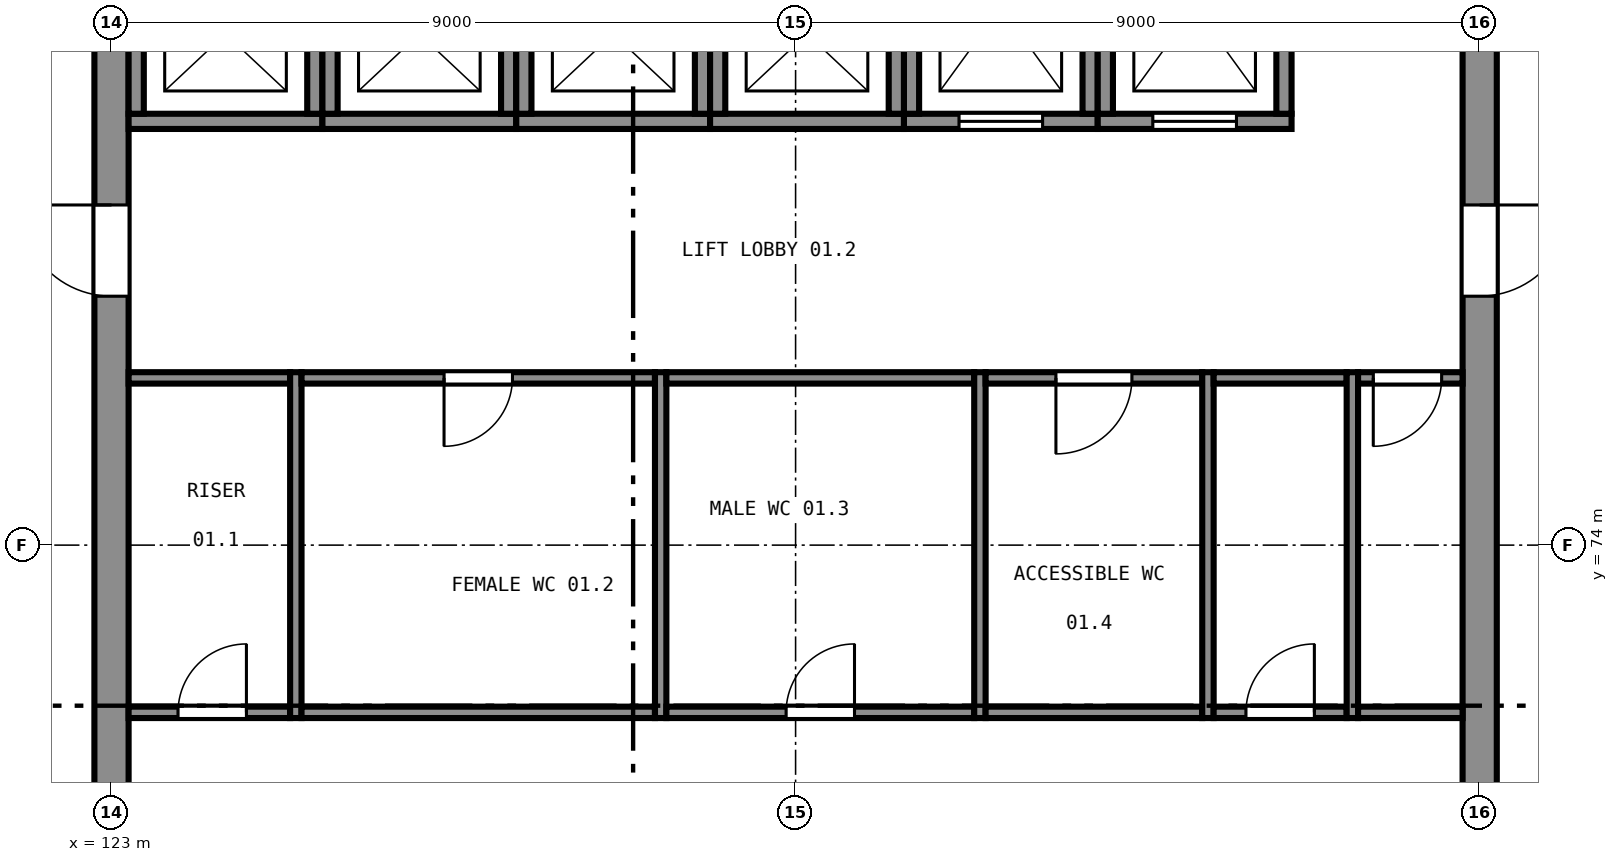
"""IFC4 building model, lengths in metres.
Left out: names, types, materials, properties, quantities, classifications, styles, units other than length and angle.
Written with IfcOpenShell. Run it as: python <this file> out.ifc"""

import sys

from ifc_helpers import new_model, si_unit, direction, frame, frame_2d, origin, place, context, subcontext, project, spatial, rectangle, extrude, element, fill, save


model = new_model("IFC4")
c1 = context("Model", 3, precision=1e-05, world=origin(), true_north=direction((0.0, 1.0)))
c2 = subcontext(c1, "Body", "Model", "MODEL_VIEW")
j1 = project(units=[si_unit("LENGTHUNIT", "METRE"), si_unit("PLANEANGLEUNIT", "RADIAN")], contexts=[c1])
p1 = place(None, origin())
s1 = spatial("IfcSite", under=j1, at=p1, CompositionType="ELEMENT")
p2 = place(p1, origin())
s2 = spatial("IfcBuilding", under=s1, at=p2, CompositionType="ELEMENT")
p3 = place(p2, frame((0.0, 0.0, 5.5)))
s3 = spatial("IfcBuildingStorey", under=s2, at=p3, CompositionType="ELEMENT", Elevation=5.5)
p4 = place(p3, frame((141.0, 65.225, 0.0), z_axis=(0.0, 0.0, 1.0), x_axis=(0.0, 1.0, 0.0)))
e1 = element("IfcWall", 1, at=p4, inside=s3, PredefinedType="SHEAR", context=c2, shape_type="SweptSolid", body=[
    extrude(rectangle(XDim=17.55, YDim=0.45, at=frame_2d((8.775, 0.0))), origin(), (0.0, 0.0, 1.0), 4.0),
])
p5 = place(p4, frame((4.3, 0.0, 0.0)))
e2 = element("IfcOpeningElement", 2, at=p5, cuts=e1, PredefinedType="OPENING", context=c2, shape_type="SweptSolid", body=[
    extrude(rectangle(XDim=1.2, YDim=2.1, at=frame_2d((0.6, 1.05))), frame((0.0, 0.235, 0.0), z_axis=(0.0, -1.0, 0.0), x_axis=(1.0, 0.0, 0.0)), (0.0, 0.0, 1.0), 0.47),
])
p6 = place(p4, frame((12.05, 0.0, 0.0)))
e3 = element("IfcOpeningElement", 3, at=p6, cuts=e1, PredefinedType="OPENING", context=c2, shape_type="SweptSolid", body=[
    extrude(rectangle(XDim=1.2, YDim=2.1, at=frame_2d((0.6, 1.05))), frame((0.0, 0.235, 0.0), z_axis=(0.0, -1.0, 0.0), x_axis=(1.0, 0.0, 0.0)), (0.0, 0.0, 1.0), 0.47),
])
p7 = place(p3, frame((123.0, 82.775, 0.0), z_axis=(0.0, 0.0, 1.0), x_axis=(0.0, -1.0, 0.0)))
e4 = element("IfcWall", 4, at=p7, inside=s3, PredefinedType="SHEAR", context=c2, shape_type="SweptSolid", body=[
    extrude(rectangle(XDim=17.55, YDim=0.45, at=frame_2d((8.775, 0.0))), origin(), (0.0, 0.0, 1.0), 4.0),
])
p8 = place(p7, frame((12.05, 0.0, 0.0)))
e5 = element("IfcOpeningElement", 5, at=p8, cuts=e4, PredefinedType="OPENING", context=c2, shape_type="SweptSolid", body=[
    extrude(rectangle(XDim=1.2, YDim=2.1, at=frame_2d((0.6, 1.05))), frame((0.0, 0.235, 0.0), z_axis=(0.0, -1.0, 0.0), x_axis=(1.0, 0.0, 0.0)), (0.0, 0.0, 1.0), 0.47),
])
p9 = place(p7, frame((4.3, 0.0, 0.0)))
e6 = element("IfcOpeningElement", 6, at=p9, cuts=e4, PredefinedType="OPENING", context=c2, shape_type="SweptSolid", body=[
    extrude(rectangle(XDim=1.2, YDim=2.1, at=frame_2d((0.6, 1.05))), frame((0.0, 0.235, 0.0), z_axis=(0.0, -1.0, 0.0), x_axis=(1.0, 0.0, 0.0)), (0.0, 0.0, 1.0), 0.47),
])
p10 = place(p3, frame((123.225, 79.575, 0.0), z_axis=(0.0, 0.0, 1.0), x_axis=(1.0, 0.0, 0.0)))
e7 = element("IfcWall", 7, at=p10, inside=s3, PredefinedType="SHEAR", context=c2, shape_type="SweptSolid", body=[
    extrude(rectangle(XDim=2.55, YDim=0.2, at=frame_2d((1.275, 0.0))), origin(), (0.0, 0.0, 1.0), 4.0),
])
for number, where, z_axis, x_axis in (
    (8, (125.675, 79.675, 0.0), (0.0, 0.0, 1.0), (0.0, 1.0, 0.0)),
    (9, (123.325, 81.775, 0.0), (0.0, 0.0, 1.0), (0.0, -1.0, 0.0)),
):
    element("IfcWall", number, at=place(p3, frame(where, z_axis=z_axis, x_axis=x_axis)), inside=s3, PredefinedType="SHEAR", context=c2, shape_type="SweptSolid", body=[
        extrude(rectangle(XDim=2.1, YDim=0.2, at=frame_2d((1.05, 0.0))), origin(), (0.0, 0.0, 1.0), 4.0),
    ])
p11 = place(p3, frame((125.775, 79.575, 0.0), z_axis=(0.0, 0.0, 1.0), x_axis=(1.0, 0.0, 0.0)))
e10 = element("IfcWall", 10, at=p11, inside=s3, PredefinedType="SHEAR", context=c2, shape_type="SweptSolid", body=[
    extrude(rectangle(XDim=2.55, YDim=0.2, at=frame_2d((1.275, 0.0))), origin(), (0.0, 0.0, 1.0), 4.0),
])
for number, where, z_axis, x_axis in (
    (11, (128.225, 79.675, 0.0), (0.0, 0.0, 1.0), (0.0, 1.0, 0.0)),
    (12, (125.875, 81.775, 0.0), (0.0, 0.0, 1.0), (0.0, -1.0, 0.0)),
):
    element("IfcWall", number, at=place(p3, frame(where, z_axis=z_axis, x_axis=x_axis)), inside=s3, PredefinedType="SHEAR", context=c2, shape_type="SweptSolid", body=[
        extrude(rectangle(XDim=2.1, YDim=0.2, at=frame_2d((1.05, 0.0))), origin(), (0.0, 0.0, 1.0), 4.0),
    ])
p12 = place(p3, frame((128.325, 79.575, 0.0), z_axis=(0.0, 0.0, 1.0), x_axis=(1.0, 0.0, 0.0)))
e13 = element("IfcWall", 13, at=p12, inside=s3, PredefinedType="SHEAR", context=c2, shape_type="SweptSolid", body=[
    extrude(rectangle(XDim=2.55, YDim=0.2, at=frame_2d((1.275, 0.0))), origin(), (0.0, 0.0, 1.0), 4.0),
])
for number, where, z_axis, x_axis in (
    (14, (130.775, 79.675, 0.0), (0.0, 0.0, 1.0), (0.0, 1.0, 0.0)),
    (15, (128.425, 81.775, 0.0), (0.0, 0.0, 1.0), (0.0, -1.0, 0.0)),
):
    element("IfcWall", number, at=place(p3, frame(where, z_axis=z_axis, x_axis=x_axis)), inside=s3, PredefinedType="SHEAR", context=c2, shape_type="SweptSolid", body=[
        extrude(rectangle(XDim=2.1, YDim=0.2, at=frame_2d((1.05, 0.0))), origin(), (0.0, 0.0, 1.0), 4.0),
    ])
p13 = place(p3, frame((130.875, 79.575, 0.0), z_axis=(0.0, 0.0, 1.0), x_axis=(1.0, 0.0, 0.0)))
e16 = element("IfcWall", 16, at=p13, inside=s3, PredefinedType="SHEAR", context=c2, shape_type="SweptSolid", body=[
    extrude(rectangle(XDim=2.55, YDim=0.2, at=frame_2d((1.275, 0.0))), origin(), (0.0, 0.0, 1.0), 4.0),
])
for number, where, z_axis, x_axis in (
    (17, (133.325, 79.675, 0.0), (0.0, 0.0, 1.0), (0.0, 1.0, 0.0)),
    (18, (130.975, 81.775, 0.0), (0.0, 0.0, 1.0), (0.0, -1.0, 0.0)),
):
    element("IfcWall", number, at=place(p3, frame(where, z_axis=z_axis, x_axis=x_axis)), inside=s3, PredefinedType="SHEAR", context=c2, shape_type="SweptSolid", body=[
        extrude(rectangle(XDim=2.1, YDim=0.2, at=frame_2d((1.05, 0.0))), origin(), (0.0, 0.0, 1.0), 4.0),
    ])
p14 = place(p3, frame((133.425, 79.575, 0.0), z_axis=(0.0, 0.0, 1.0), x_axis=(1.0, 0.0, 0.0)))
e19 = element("IfcWall", 19, at=p14, inside=s3, PredefinedType="SHEAR", context=c2, shape_type="SweptSolid", body=[
    extrude(rectangle(XDim=2.55, YDim=0.2, at=frame_2d((1.275, 0.0))), origin(), (0.0, 0.0, 1.0), 4.0),
])
p15 = place(p14, frame((0.725, 0.0, 0.0)))
e20 = element("IfcOpeningElement", 20, at=p15, cuts=e19, PredefinedType="OPENING", context=c2, shape_type="SweptSolid", body=[
    extrude(rectangle(XDim=1.1, YDim=2.1, at=frame_2d((0.55, 1.05))), frame((0.0, 0.11, 0.0), z_axis=(0.0, -1.0, 0.0), x_axis=(1.0, 0.0, 0.0)), (0.0, 0.0, 1.0), 0.22),
])
for number, where, z_axis, x_axis in (
    (21, (135.875, 79.675, 0.0), (0.0, 0.0, 1.0), (0.0, 1.0, 0.0)),
    (22, (133.525, 82.475, 0.0), (0.0, 0.0, 1.0), (0.0, -1.0, 0.0)),
):
    element("IfcWall", number, at=place(p3, frame(where, z_axis=z_axis, x_axis=x_axis)), inside=s3, PredefinedType="SHEAR", context=c2, shape_type="SweptSolid", body=[
        extrude(rectangle(XDim=2.8, YDim=0.2, at=frame_2d((1.4, 0.0))), origin(), (0.0, 0.0, 1.0), 4.0),
    ])
p16 = place(p3, frame((135.975, 79.575, 0.0), z_axis=(0.0, 0.0, 1.0), x_axis=(1.0, 0.0, 0.0)))
e23 = element("IfcWall", 23, at=p16, inside=s3, PredefinedType="SHEAR", context=c2, shape_type="SweptSolid", body=[
    extrude(rectangle(XDim=2.55, YDim=0.2, at=frame_2d((1.275, 0.0))), origin(), (0.0, 0.0, 1.0), 4.0),
])
p17 = place(p16, frame((0.725, 0.0, 0.0)))
e24 = element("IfcOpeningElement", 24, at=p17, cuts=e23, PredefinedType="OPENING", context=c2, shape_type="SweptSolid", body=[
    extrude(rectangle(XDim=1.1, YDim=2.1, at=frame_2d((0.55, 1.05))), frame((0.0, 0.11, 0.0), z_axis=(0.0, -1.0, 0.0), x_axis=(1.0, 0.0, 0.0)), (0.0, 0.0, 1.0), 0.22),
])
for number, where, z_axis, x_axis in (
    (25, (138.425, 79.675, 0.0), (0.0, 0.0, 1.0), (0.0, 1.0, 0.0)),
    (26, (136.075, 82.475, 0.0), (0.0, 0.0, 1.0), (0.0, -1.0, 0.0)),
):
    element("IfcWall", number, at=place(p3, frame(where, z_axis=z_axis, x_axis=x_axis)), inside=s3, PredefinedType="SHEAR", context=c2, shape_type="SweptSolid", body=[
        extrude(rectangle(XDim=2.8, YDim=0.2, at=frame_2d((1.4, 0.0))), origin(), (0.0, 0.0, 1.0), 4.0),
    ])
p18 = place(p3, frame((125.425, 71.725, 0.0), z_axis=(0.0, 0.0, 1.0), x_axis=(0.0, 1.0, 0.0)))
e27 = element("IfcWall", 27, at=p18, inside=s3, PredefinedType="PARTITIONING", context=c2, shape_type="SweptSolid", body=[
    extrude(rectangle(XDim=4.55, YDim=0.15, at=frame_2d((2.275, 0.0))), origin(), (0.0, 0.0, 1.0), 3.75),
])
p19 = place(p3, frame((123.225, 71.8, 0.0), z_axis=(0.0, 0.0, 1.0), x_axis=(1.0, 0.0, 0.0)))
e28 = element("IfcWall", 28, at=p19, inside=s3, PredefinedType="PARTITIONING", context=c2, shape_type="SweptSolid", body=[
    extrude(rectangle(XDim=2.125, YDim=0.15, at=frame_2d((1.062, 0.0))), origin(), (0.0, 0.0, 1.0), 3.75),
])
p20 = place(p19, frame((0.65, 0.0, 0.0)))
e29 = element("IfcOpeningElement", 29, at=p20, cuts=e28, PredefinedType="OPENING", context=c2, shape_type="SweptSolid", body=[
    extrude(rectangle(XDim=0.9, YDim=2.1, at=frame_2d((0.45, 1.05))), frame((0.0, 0.085, 0.0), z_axis=(0.0, -1.0, 0.0), x_axis=(1.0, 0.0, 0.0)), (0.0, 0.0, 1.0), 0.17),
])
p21 = place(p3, frame((123.225, 76.2, 0.0), z_axis=(0.0, 0.0, 1.0), x_axis=(1.0, 0.0, 0.0)))
e30 = element("IfcWall", 30, at=p21, inside=s3, PredefinedType="PARTITIONING", context=c2, shape_type="SweptSolid", body=[
    extrude(rectangle(XDim=2.125, YDim=0.15, at=frame_2d((1.062, 0.0))), origin(), (0.0, 0.0, 1.0), 3.75),
])
p22 = place(p3, frame((130.225, 71.725, 0.0), z_axis=(0.0, 0.0, 1.0), x_axis=(0.0, 1.0, 0.0)))
e31 = element("IfcWall", 31, at=p22, inside=s3, PredefinedType="PARTITIONING", context=c2, shape_type="SweptSolid", body=[
    extrude(rectangle(XDim=4.55, YDim=0.15, at=frame_2d((2.275, 0.0))), origin(), (0.0, 0.0, 1.0), 3.75),
])
p23 = place(p3, frame((125.5, 71.8, 0.0), z_axis=(0.0, 0.0, 1.0), x_axis=(1.0, 0.0, 0.0)))
e32 = element("IfcWall", 32, at=p23, inside=s3, PredefinedType="PARTITIONING", context=c2, shape_type="SweptSolid", body=[
    extrude(rectangle(XDim=4.65, YDim=0.15, at=frame_2d((2.325, 0.0))), origin(), (0.0, 0.0, 1.0), 3.75),
])
p24 = place(p3, frame((125.5, 76.2, 0.0), z_axis=(0.0, 0.0, 1.0), x_axis=(1.0, 0.0, 0.0)))
e33 = element("IfcWall", 33, at=p24, inside=s3, PredefinedType="PARTITIONING", context=c2, shape_type="SweptSolid", body=[
    extrude(rectangle(XDim=4.65, YDim=0.15, at=frame_2d((2.325, 0.0))), origin(), (0.0, 0.0, 1.0), 3.75),
])
p25 = place(p24, frame((1.875, 0.0, 0.0)))
e34 = element("IfcOpeningElement", 34, at=p25, cuts=e33, PredefinedType="OPENING", context=c2, shape_type="SweptSolid", body=[
    extrude(rectangle(XDim=0.9, YDim=2.1, at=frame_2d((0.45, 1.05))), frame((0.0, 0.085, 0.0), z_axis=(0.0, -1.0, 0.0), x_axis=(1.0, 0.0, 0.0)), (0.0, 0.0, 1.0), 0.17),
])
p26 = place(p3, frame((134.425, 71.725, 0.0), z_axis=(0.0, 0.0, 1.0), x_axis=(0.0, 1.0, 0.0)))
e35 = element("IfcWall", 35, at=p26, inside=s3, PredefinedType="PARTITIONING", context=c2, shape_type="SweptSolid", body=[
    extrude(rectangle(XDim=4.55, YDim=0.15, at=frame_2d((2.275, 0.0))), origin(), (0.0, 0.0, 1.0), 3.75),
])
p27 = place(p3, frame((130.3, 71.8, 0.0), z_axis=(0.0, 0.0, 1.0), x_axis=(1.0, 0.0, 0.0)))
e36 = element("IfcWall", 36, at=p27, inside=s3, PredefinedType="PARTITIONING", context=c2, shape_type="SweptSolid", body=[
    extrude(rectangle(XDim=4.05, YDim=0.15, at=frame_2d((2.025, 0.0))), origin(), (0.0, 0.0, 1.0), 3.75),
])
p28 = place(p27, frame((1.575, 0.0, 0.0)))
e37 = element("IfcOpeningElement", 37, at=p28, cuts=e36, PredefinedType="OPENING", context=c2, shape_type="SweptSolid", body=[
    extrude(rectangle(XDim=0.9, YDim=2.1, at=frame_2d((0.45, 1.05))), frame((0.0, 0.085, 0.0), z_axis=(0.0, -1.0, 0.0), x_axis=(1.0, 0.0, 0.0)), (0.0, 0.0, 1.0), 0.17),
])
p29 = place(p3, frame((130.3, 76.2, 0.0), z_axis=(0.0, 0.0, 1.0), x_axis=(1.0, 0.0, 0.0)))
e38 = element("IfcWall", 38, at=p29, inside=s3, PredefinedType="PARTITIONING", context=c2, shape_type="SweptSolid", body=[
    extrude(rectangle(XDim=4.05, YDim=0.15, at=frame_2d((2.025, 0.0))), origin(), (0.0, 0.0, 1.0), 3.75),
])
p30 = place(p3, frame((137.425, 71.725, 0.0), z_axis=(0.0, 0.0, 1.0), x_axis=(0.0, 1.0, 0.0)))
e39 = element("IfcWall", 39, at=p30, inside=s3, PredefinedType="PARTITIONING", context=c2, shape_type="SweptSolid", body=[
    extrude(rectangle(XDim=4.55, YDim=0.15, at=frame_2d((2.275, 0.0))), origin(), (0.0, 0.0, 1.0), 3.75),
])
p31 = place(p3, frame((134.5, 71.8, 0.0), z_axis=(0.0, 0.0, 1.0), x_axis=(1.0, 0.0, 0.0)))
e40 = element("IfcWall", 40, at=p31, inside=s3, PredefinedType="PARTITIONING", context=c2, shape_type="SweptSolid", body=[
    extrude(rectangle(XDim=2.85, YDim=0.15, at=frame_2d((1.425, 0.0))), origin(), (0.0, 0.0, 1.0), 3.75),
])
p32 = place(p3, frame((134.5, 76.2, 0.0), z_axis=(0.0, 0.0, 1.0), x_axis=(1.0, 0.0, 0.0)))
e41 = element("IfcWall", 41, at=p32, inside=s3, PredefinedType="PARTITIONING", context=c2, shape_type="SweptSolid", body=[
    extrude(rectangle(XDim=2.85, YDim=0.15, at=frame_2d((1.425, 0.0))), origin(), (0.0, 0.0, 1.0), 3.75),
])
p33 = place(p32, frame((0.925, 0.0, 0.0)))
e42 = element("IfcOpeningElement", 42, at=p33, cuts=e41, PredefinedType="OPENING", context=c2, shape_type="SweptSolid", body=[
    extrude(rectangle(XDim=1.0, YDim=2.1, at=frame_2d((0.5, 1.05))), frame((0.0, 0.085, 0.0), z_axis=(0.0, -1.0, 0.0), x_axis=(1.0, 0.0, 0.0)), (0.0, 0.0, 1.0), 0.17),
])
p34 = place(p3, frame((139.325, 71.725, 0.0), z_axis=(0.0, 0.0, 1.0), x_axis=(0.0, 1.0, 0.0)))
e43 = element("IfcWall", 43, at=p34, inside=s3, PredefinedType="PARTITIONING", context=c2, shape_type="SweptSolid", body=[
    extrude(rectangle(XDim=4.55, YDim=0.15, at=frame_2d((2.275, 0.0))), origin(), (0.0, 0.0, 1.0), 3.75),
])
p35 = place(p3, frame((137.5, 71.8, 0.0), z_axis=(0.0, 0.0, 1.0), x_axis=(1.0, 0.0, 0.0)))
e44 = element("IfcWall", 44, at=p35, inside=s3, PredefinedType="PARTITIONING", context=c2, shape_type="SweptSolid", body=[
    extrude(rectangle(XDim=1.75, YDim=0.15, at=frame_2d((0.875, 0.0))), origin(), (0.0, 0.0, 1.0), 3.75),
])
p36 = place(p35, frame((0.425, 0.0, 0.0)))
e45 = element("IfcOpeningElement", 45, at=p36, cuts=e44, PredefinedType="OPENING", context=c2, shape_type="SweptSolid", body=[
    extrude(rectangle(XDim=0.9, YDim=2.1, at=frame_2d((0.45, 1.05))), frame((0.0, 0.085, 0.0), z_axis=(0.0, -1.0, 0.0), x_axis=(1.0, 0.0, 0.0)), (0.0, 0.0, 1.0), 0.17),
])
p37 = place(p3, frame((137.5, 76.2, 0.0), z_axis=(0.0, 0.0, 1.0), x_axis=(1.0, 0.0, 0.0)))
e46 = element("IfcWall", 46, at=p37, inside=s3, PredefinedType="PARTITIONING", context=c2, shape_type="SweptSolid", body=[
    extrude(rectangle(XDim=1.75, YDim=0.15, at=frame_2d((0.875, 0.0))), origin(), (0.0, 0.0, 1.0), 3.75),
])
p38 = place(p3, frame((139.4, 71.8, 0.0), z_axis=(0.0, 0.0, 1.0), x_axis=(1.0, 0.0, 0.0)))
e47 = element("IfcWall", 47, at=p38, inside=s3, PredefinedType="PARTITIONING", context=c2, shape_type="SweptSolid", body=[
    extrude(rectangle(XDim=1.375, YDim=0.15, at=frame_2d((0.688, 0.0))), origin(), (0.0, 0.0, 1.0), 3.75),
])
p39 = place(p3, frame((139.4, 76.2, 0.0), z_axis=(0.0, 0.0, 1.0), x_axis=(1.0, 0.0, 0.0)))
e48 = element("IfcWall", 48, at=p39, inside=s3, PredefinedType="PARTITIONING", context=c2, shape_type="SweptSolid", body=[
    extrude(rectangle(XDim=1.375, YDim=0.15, at=frame_2d((0.688, 0.0))), origin(), (0.0, 0.0, 1.0), 3.75),
])
p40 = place(p39, frame((0.2, 0.0, 0.0)))
e49 = element("IfcOpeningElement", 49, at=p40, cuts=e48, PredefinedType="OPENING", context=c2, shape_type="SweptSolid", body=[
    extrude(rectangle(XDim=0.9, YDim=2.1, at=frame_2d((0.45, 1.05))), frame((0.0, 0.085, 0.0), z_axis=(0.0, -1.0, 0.0), x_axis=(1.0, 0.0, 0.0)), (0.0, 0.0, 1.0), 0.17),
])
p41 = place(p15, origin())
e50 = element("IfcDoor", 50, at=p41, inside=s3, OperationType="SLIDING_TO_LEFT", PredefinedType="DOOR", context=c2, shape_type="SweptSolid", body=[
    extrude(rectangle(XDim=1.1, YDim=2.1, at=frame_2d((0.55, 1.05))), frame((0.0, 0.025, 0.0), z_axis=(0.0, -1.0, 0.0), x_axis=(1.0, 0.0, 0.0)), (0.0, 0.0, 1.0), 0.05),
])
fill(e20, e50)
p42 = place(p17, origin())
e51 = element("IfcDoor", 51, at=p42, inside=s3, OperationType="SLIDING_TO_LEFT", PredefinedType="DOOR", context=c2, shape_type="SweptSolid", body=[
    extrude(rectangle(XDim=1.1, YDim=2.1, at=frame_2d((0.55, 1.05))), frame((0.0, 0.025, 0.0), z_axis=(0.0, -1.0, 0.0), x_axis=(1.0, 0.0, 0.0)), (0.0, 0.0, 1.0), 0.05),
])
fill(e24, e51)
p43 = place(p9, frame((1.2, 0.0, 0.0), z_axis=(0.0, 0.0, 1.0), x_axis=(-1.0, 0.0, 0.0)))
e52 = element("IfcDoor", 52, at=p43, inside=s3, OperationType="SINGLE_SWING_LEFT", PredefinedType="DOOR", context=c2, shape_type="SweptSolid", body=[
    extrude(rectangle(XDim=1.2, YDim=2.1, at=frame_2d((0.6, 1.05))), frame((0.0, 0.025, 0.0), z_axis=(0.0, -1.0, 0.0), x_axis=(1.0, 0.0, 0.0)), (0.0, 0.0, 1.0), 0.05),
])
fill(e6, e52)
p44 = place(p6, frame((1.2, 0.0, 0.0), z_axis=(0.0, 0.0, 1.0), x_axis=(-1.0, 0.0, 0.0)))
e53 = element("IfcDoor", 53, at=p44, inside=s3, OperationType="SINGLE_SWING_RIGHT", PredefinedType="DOOR", context=c2, shape_type="SweptSolid", body=[
    extrude(rectangle(XDim=1.2, YDim=2.1, at=frame_2d((0.6, 1.05))), frame((0.0, 0.025, 0.0), z_axis=(0.0, -1.0, 0.0), x_axis=(1.0, 0.0, 0.0)), (0.0, 0.0, 1.0), 0.05),
])
fill(e3, e53)
p45 = place(p20, origin())
e54 = element("IfcDoor", 54, at=p45, inside=s3, OperationType="SINGLE_SWING_LEFT", PredefinedType="DOOR", context=c2, shape_type="SweptSolid", body=[
    extrude(rectangle(XDim=0.9, YDim=2.1, at=frame_2d((0.45, 1.05))), frame((0.0, 0.025, 0.0), z_axis=(0.0, -1.0, 0.0), x_axis=(1.0, 0.0, 0.0)), (0.0, 0.0, 1.0), 0.05),
])
fill(e29, e54)
p46 = place(p25, frame((0.9, 0.0, 0.0), z_axis=(0.0, 0.0, 1.0), x_axis=(-1.0, 0.0, 0.0)))
e55 = element("IfcDoor", 55, at=p46, inside=s3, OperationType="SINGLE_SWING_LEFT", PredefinedType="DOOR", context=c2, shape_type="SweptSolid", body=[
    extrude(rectangle(XDim=0.9, YDim=2.1, at=frame_2d((0.45, 1.05))), frame((0.0, 0.025, 0.0), z_axis=(0.0, -1.0, 0.0), x_axis=(1.0, 0.0, 0.0)), (0.0, 0.0, 1.0), 0.05),
])
fill(e34, e55)
p47 = place(p28, origin())
e56 = element("IfcDoor", 56, at=p47, inside=s3, OperationType="SINGLE_SWING_LEFT", PredefinedType="DOOR", context=c2, shape_type="SweptSolid", body=[
    extrude(rectangle(XDim=0.9, YDim=2.1, at=frame_2d((0.45, 1.05))), frame((0.0, 0.025, 0.0), z_axis=(0.0, -1.0, 0.0), x_axis=(1.0, 0.0, 0.0)), (0.0, 0.0, 1.0), 0.05),
])
fill(e37, e56)
p48 = place(p33, frame((1.0, 0.0, 0.0), z_axis=(0.0, 0.0, 1.0), x_axis=(-1.0, 0.0, 0.0)))
e57 = element("IfcDoor", 57, at=p48, inside=s3, OperationType="SINGLE_SWING_LEFT", PredefinedType="DOOR", context=c2, shape_type="SweptSolid", body=[
    extrude(rectangle(XDim=1.0, YDim=2.1, at=frame_2d((0.5, 1.05))), frame((0.0, 0.025, 0.0), z_axis=(0.0, -1.0, 0.0), x_axis=(1.0, 0.0, 0.0)), (0.0, 0.0, 1.0), 0.05),
])
fill(e42, e57)
p49 = place(p36, origin())
e58 = element("IfcDoor", 58, at=p49, inside=s3, OperationType="SINGLE_SWING_LEFT", PredefinedType="DOOR", context=c2, shape_type="SweptSolid", body=[
    extrude(rectangle(XDim=0.9, YDim=2.1, at=frame_2d((0.45, 1.05))), frame((0.0, 0.025, 0.0), z_axis=(0.0, -1.0, 0.0), x_axis=(1.0, 0.0, 0.0)), (0.0, 0.0, 1.0), 0.05),
])
fill(e45, e58)
p50 = place(p40, frame((0.9, 0.0, 0.0), z_axis=(0.0, 0.0, 1.0), x_axis=(-1.0, 0.0, 0.0)))
e59 = element("IfcDoor", 59, at=p50, inside=s3, OperationType="SINGLE_SWING_LEFT", PredefinedType="DOOR", context=c2, shape_type="SweptSolid", body=[
    extrude(rectangle(XDim=0.9, YDim=2.1, at=frame_2d((0.45, 1.05))), frame((0.0, 0.025, 0.0), z_axis=(0.0, -1.0, 0.0), x_axis=(1.0, 0.0, 0.0)), (0.0, 0.0, 1.0), 0.05),
])
fill(e49, e59)
save(model, sys.argv[1])
